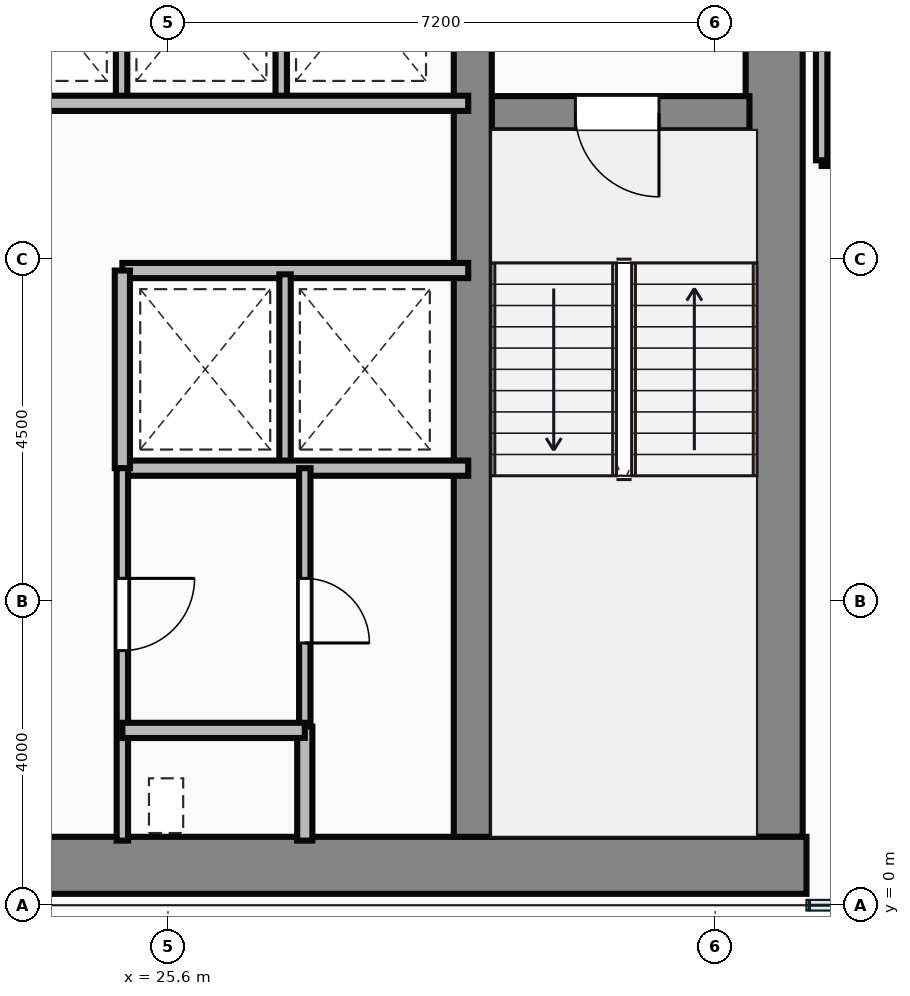
"""IFC4 building model, lengths in metres.
Left out: names, types, materials, properties, quantities, classifications, styles, units other than length and angle.
Written with IfcOpenShell. Run it as: python <this file> out.ifc"""

import sys

from ifc_helpers import new_model, si_unit, direction, frame, frame_2d, origin, place, context, subcontext, project, spatial, rectangle, extrude, source, transform, mapped, element, fill, save


model = new_model("IFC4")
c1 = context("Model", 3, precision=1e-05, world=origin(), true_north=direction((0.0, 1.0)))
c2 = subcontext(c1, "Body", "Model", "MODEL_VIEW")
j1 = project(units=[si_unit("LENGTHUNIT", "METRE"), si_unit("PLANEANGLEUNIT", "RADIAN")], contexts=[c1])
p1 = place(None, origin())
s1 = spatial("IfcSite", under=j1, at=p1, CompositionType="ELEMENT")
p2 = place(p1, origin())
s2 = spatial("IfcBuilding", under=s1, at=p2, CompositionType="ELEMENT")
p3 = place(p2, frame((0.0, 0.0, 99.6)))
s3 = spatial("IfcBuildingStorey", under=s2, at=p3, CompositionType="ELEMENT", Elevation=99.6)
m1 = source(origin(), c2, "Body", "SweptSolid", [
    extrude(rectangle(XDim=29.5, YDim=0.75, at=frame_2d((14.75, 0.0))), origin(), (0.0, 0.0, 1.0), 3.65),
])
p4 = place(p3, frame((4.5, 0.525, 0.0), z_axis=(0.0, 0.0, 1.0), x_axis=(1.0, 0.0, 0.0)))
e1 = element("IfcWall", 1, at=p4, inside=s3, PredefinedType="SHEAR", context=c2, shape_type="MappedRepresentation", body=[
    mapped(m1, transform((0.0, 0.0, 0.0))),
])
m2 = source(origin(), c2, "Body", "SweptSolid", [
    extrude(rectangle(XDim=13.1, YDim=0.75, at=frame_2d((6.55, 0.0))), origin(), (0.0, 0.0, 1.0), 3.65),
])
p5 = place(p3, frame((33.575, 0.9, 0.0), z_axis=(0.0, 0.0, 1.0), x_axis=(0.0, 1.0, 0.0)))
e2 = element("IfcWall", 2, at=p5, inside=s3, PredefinedType="SHEAR", context=c2, shape_type="MappedRepresentation", body=[
    mapped(m2, transform((0.0, 0.0, 0.0))),
])
m3 = source(origin(), c2, "Body", "SweptSolid", [
    extrude(rectangle(XDim=12.35, YDim=0.5, at=frame_2d((6.175, 0.0))), origin(), (0.0, 0.0, 1.0), 3.65),
])
p6 = place(p3, frame((29.61, 0.9, 0.0), z_axis=(0.0, 0.0, 1.0), x_axis=(0.0, 1.0, 0.0)))
e3 = element("IfcWall", 3, at=p6, inside=s3, PredefinedType="SHEAR", context=c2, shape_type="MappedRepresentation", body=[
    mapped(m3, transform((0.0, 0.0, 0.0))),
])
m4 = source(origin(), c2, "Body", "SweptSolid", [
    extrude(rectangle(XDim=3.39, YDim=0.45, at=frame_2d((1.695, 0.0))), origin(), (0.0, 0.0, 1.0), 3.65),
])
p7 = place(p3, frame((29.86, 10.42, 0.0), z_axis=(0.0, 0.0, 1.0), x_axis=(1.0, 0.0, 0.0)))
e4 = element("IfcWall", 4, at=p7, inside=s3, PredefinedType="SHEAR", context=c2, shape_type="MappedRepresentation", body=[
    mapped(m4, transform((0.0, 0.0, 0.0))),
])
p8 = place(p7, frame((1.1, 0.0, 0.0)))
e5 = element("IfcOpeningElement", 5, at=p8, cuts=e4, PredefinedType="OPENING", context=c2, shape_type="SweptSolid", body=[
    extrude(rectangle(XDim=1.1, YDim=2.15, at=frame_2d((0.55, 1.075))), frame((0.0, 0.235, 0.0), z_axis=(0.0, -1.0, 0.0), x_axis=(1.0, 0.0, 0.0)), (0.0, 0.0, 1.0), 0.47),
])
m5 = source(origin(), c2, "Body", "SweptSolid", [
    extrude(rectangle(XDim=8.8, YDim=0.2, at=frame_2d((4.4, 0.0))), origin(), (0.0, 0.0, 1.0), 3.4),
])
p9 = place(p3, frame((20.75, 10.55, 0.0), z_axis=(0.0, 0.0, 1.0), x_axis=(1.0, 0.0, 0.0)))
e6 = element("IfcWall", 6, at=p9, inside=s3, PredefinedType="PARTITIONING", context=c2, shape_type="MappedRepresentation", body=[
    mapped(m5, transform((0.0, 0.0, 0.0))),
])
m6 = source(origin(), c2, "Body", "SweptSolid", [
    extrude(rectangle(XDim=2.85, YDim=0.15, at=frame_2d((1.425, 0.0))), origin(), (0.0, 0.0, 1.0), 3.4),
])
for number, where, z_axis, x_axis in (
    (7, (24.99, 10.6, 0.0), (0.0, 0.0, 1.0), (0.0, 1.0, 0.0)),
    (8, (27.09, 10.6, 0.0), (0.0, 0.0, 1.0), (0.0, 1.0, 0.0)),
):
    element("IfcWall", number, at=place(p3, frame(where, z_axis=z_axis, x_axis=x_axis)), inside=s3, PredefinedType="PARTITIONING", context=c2, shape_type="MappedRepresentation", body=[
        mapped(m6, transform((0.0, 0.0, 0.0))),
    ])
m7 = source(origin(), c2, "Body", "SweptSolid", [
    extrude(rectangle(XDim=4.55, YDim=0.2, at=frame_2d((2.275, 0.0))), origin(), (0.0, 0.0, 1.0), 3.4),
])
for number, where, z_axis, x_axis in (
    (9, (25.0, 8.35, 0.0), (0.0, 0.0, 1.0), (1.0, 0.0, 0.0)),
    (10, (25.0, 5.75, 0.0), (0.0, 0.0, 1.0), (1.0, 0.0, 0.0)),
):
    element("IfcWall", number, at=place(p3, frame(where, z_axis=z_axis, x_axis=x_axis)), inside=s3, PredefinedType="PARTITIONING", context=c2, shape_type="MappedRepresentation", body=[
        mapped(m7, transform((0.0, 0.0, 0.0))),
    ])
m8 = source(origin(), c2, "Body", "SweptSolid", [
    extrude(rectangle(XDim=2.6, YDim=0.2, at=frame_2d((1.3, 0.0))), origin(), (0.0, 0.0, 1.0), 3.4),
])
p10 = place(p3, frame((25.0, 5.75, 0.0), z_axis=(0.0, 0.0, 1.0), x_axis=(0.0, 1.0, 0.0)))
e11 = element("IfcWall", 11, at=p10, inside=s3, PredefinedType="PARTITIONING", context=c2, shape_type="MappedRepresentation", body=[
    mapped(m8, transform((0.0, 0.0, 0.0))),
])
m9 = source(origin(), c2, "Body", "SweptSolid", [
    extrude(rectangle(XDim=2.5, YDim=0.15, at=frame_2d((1.25, 0.0))), origin(), (0.0, 0.0, 1.0), 3.4),
])
p11 = place(p3, frame((27.14, 5.8, 0.0), z_axis=(0.0, 0.0, 1.0), x_axis=(0.0, 1.0, 0.0)))
e12 = element("IfcWall", 12, at=p11, inside=s3, PredefinedType="PARTITIONING", context=c2, shape_type="MappedRepresentation", body=[
    mapped(m9, transform((0.0, 0.0, 0.0))),
])
m10 = source(origin(), c2, "Body", "SweptSolid", [
    extrude(rectangle(XDim=4.9, YDim=0.15, at=frame_2d((2.45, 0.0))), origin(), (0.0, 0.0, 1.0), 3.4),
])
p12 = place(p3, frame((25.0, 0.85, 0.0), z_axis=(0.0, 0.0, 1.0), x_axis=(0.0, 1.0, 0.0)))
e13 = element("IfcWall", 13, at=p12, inside=s3, PredefinedType="PARTITIONING", context=c2, shape_type="MappedRepresentation", body=[
    mapped(m10, transform((0.0, 0.0, 0.0))),
])
p13 = place(p12, frame((2.5, 0.0, 0.0)))
e14 = element("IfcOpeningElement", 14, at=p13, cuts=e13, PredefinedType="OPENING", context=c2, shape_type="SweptSolid", body=[
    extrude(rectangle(XDim=0.95, YDim=2.15, at=frame_2d((0.475, 1.075))), frame((0.0, 0.085, 0.0), z_axis=(0.0, -1.0, 0.0), x_axis=(1.0, 0.0, 0.0)), (0.0, 0.0, 1.0), 0.17),
])
m11 = source(origin(), c2, "Body", "SweptSolid", [
    extrude(rectangle(XDim=2.4, YDim=0.2, at=frame_2d((1.2, 0.0))), origin(), (0.0, 0.0, 1.0), 3.4),
])
p14 = place(p3, frame((25.0, 2.3, 0.0), z_axis=(0.0, 0.0, 1.0), x_axis=(1.0, 0.0, 0.0)))
e15 = element("IfcWall", 15, at=p14, inside=s3, PredefinedType="PARTITIONING", context=c2, shape_type="MappedRepresentation", body=[
    mapped(m11, transform((0.0, 0.0, 0.0))),
])
m12 = source(origin(), c2, "Body", "SweptSolid", [
    extrude(rectangle(XDim=1.5, YDim=0.2, at=frame_2d((0.75, 0.0))), origin(), (0.0, 0.0, 1.0), 3.4),
])
p15 = place(p3, frame((27.4, 0.85, 0.0), z_axis=(0.0, 0.0, 1.0), x_axis=(0.0, 1.0, 0.0)))
e16 = element("IfcWall", 16, at=p15, inside=s3, PredefinedType="PARTITIONING", context=c2, shape_type="MappedRepresentation", body=[
    mapped(m12, transform((0.0, 0.0, 0.0))),
])
m13 = source(origin(), c2, "Body", "SweptSolid", [
    extrude(rectangle(XDim=3.4, YDim=0.15, at=frame_2d((1.7, 0.0))), origin(), (0.0, 0.0, 1.0), 3.4),
])
p16 = place(p3, frame((27.4, 2.35, 0.0), z_axis=(0.0, 0.0, 1.0), x_axis=(0.0, 1.0, 0.0)))
e17 = element("IfcWall", 17, at=p16, inside=s3, PredefinedType="PARTITIONING", context=c2, shape_type="MappedRepresentation", body=[
    mapped(m13, transform((0.0, 0.0, 0.0))),
])
p17 = place(p16, frame((1.1, 0.0, 0.0)))
e18 = element("IfcOpeningElement", 18, at=p17, cuts=e17, PredefinedType="OPENING", context=c2, shape_type="SweptSolid", body=[
    extrude(rectangle(XDim=0.85, YDim=2.1, at=frame_2d((0.425, 1.05))), frame((0.0, 0.085, 0.0), z_axis=(0.0, -1.0, 0.0), x_axis=(1.0, 0.0, 0.0)), (0.0, 0.0, 1.0), 0.17),
])
m14 = source(origin(), c2, "Body", "SweptSolid", [
    extrude(rectangle(XDim=4.8, YDim=0.15, at=frame_2d((2.4, 0.0))), origin(), (0.0, 0.0, 1.0), 3.4),
])
p18 = place(p3, frame((34.2, 9.8, 0.0), z_axis=(0.0, 0.0, 1.0), x_axis=(1.0, 0.0, 0.0)))
e19 = element("IfcWall", 19, at=p18, inside=s3, PredefinedType="PARTITIONING", context=c2, shape_type="MappedRepresentation", body=[
    mapped(m14, transform((0.0, 0.0, 0.0))),
])
m15 = source(origin(), c2, "Body", "SweptSolid", [
    extrude(rectangle(XDim=4.18, YDim=0.15, at=frame_2d((2.09, 0.0))), origin(), (0.0, 0.0, 1.0), 3.4),
])
p19 = place(p3, frame((34.2, 9.8, 0.0), z_axis=(0.0, 0.0, 1.0), x_axis=(0.0, 1.0, 0.0)))
e20 = element("IfcWall", 20, at=p19, inside=s3, PredefinedType="PARTITIONING", context=c2, shape_type="MappedRepresentation", body=[
    mapped(m15, transform((0.0, 0.0, 0.0))),
])
m16 = source(origin(), c2, "Body", "SweptSolid", [
    extrude(rectangle(XDim=1.1, YDim=2.15, at=frame_2d((0.55, 1.075))), frame((0.0, 0.025, 0.0), z_axis=(0.0, -1.0, 0.0), x_axis=(1.0, 0.0, 0.0)), (0.0, 0.0, 1.0), 0.05),
])
p20 = place(p8, frame((1.1, 0.0, 0.0), z_axis=(0.0, 0.0, 1.0), x_axis=(-1.0, 0.0, 0.0)))
e21 = element("IfcDoor", 21, at=p20, inside=s3, OperationType="SINGLE_SWING_RIGHT", PredefinedType="DOOR", context=c2, shape_type="MappedRepresentation", body=[
    mapped(m16, transform((0.0, 0.0, 0.0))),
])
fill(e5, e21)
m17 = source(origin(), c2, "Body", "SweptSolid", [
    extrude(rectangle(XDim=0.95, YDim=2.15, at=frame_2d((0.475, 1.075))), frame((0.0, 0.025, 0.0), z_axis=(0.0, -1.0, 0.0), x_axis=(1.0, 0.0, 0.0)), (0.0, 0.0, 1.0), 0.05),
])
p21 = place(p13, origin())
e22 = element("IfcDoor", 22, at=p21, inside=s3, OperationType="SINGLE_SWING_RIGHT", PredefinedType="DOOR", context=c2, shape_type="MappedRepresentation", body=[
    mapped(m17, transform((0.0, 0.0, 0.0))),
])
fill(e14, e22)
m18 = source(origin(), c2, "Body", "SweptSolid", [
    extrude(rectangle(XDim=0.85, YDim=2.1, at=frame_2d((0.425, 1.05))), frame((0.0, 0.025, 0.0), z_axis=(0.0, -1.0, 0.0), x_axis=(1.0, 0.0, 0.0)), (0.0, 0.0, 1.0), 0.05),
])
p22 = place(p17, frame((0.85, 0.0, 0.0), z_axis=(0.0, 0.0, 1.0), x_axis=(-1.0, 0.0, 0.0)))
e23 = element("IfcDoor", 23, at=p22, inside=s3, OperationType="SINGLE_SWING_LEFT", PredefinedType="DOOR", context=c2, shape_type="MappedRepresentation", body=[
    mapped(m18, transform((0.0, 0.0, 0.0))),
])
fill(e18, e23)
save(model, sys.argv[1])
